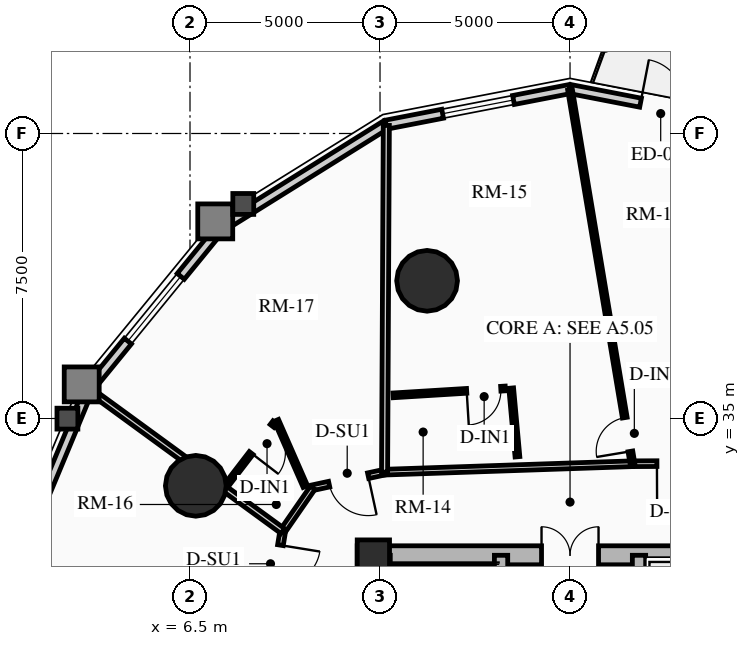
"""IFC4 building model, lengths in metres.
Left out: names, types, materials, properties, quantities, classifications, styles, units other than length and angle.
Written with IfcOpenShell. Run it as: python <this file> out.ifc"""

import sys

from ifc_helpers import new_model, si_unit, direction, frame, frame_2d, origin, origin_2d, place, context, subcontext, project, spatial, rectangle, circle, extrude, source, transform, mapped, element, fill, save


model = new_model("IFC4")
c1 = context("Model", 3, precision=1e-05, world=origin(), true_north=direction((0.0, 1.0)))
c2 = subcontext(c1, "Body", "Model", "MODEL_VIEW")
j1 = project(units=[si_unit("LENGTHUNIT", "METRE"), si_unit("PLANEANGLEUNIT", "RADIAN")], contexts=[c1])
p1 = place(None, origin())
s1 = spatial("IfcSite", under=j1, at=p1, CompositionType="ELEMENT")
p2 = place(p1, origin())
s2 = spatial("IfcBuilding", under=s1, at=p2, CompositionType="ELEMENT")
p3 = place(p2, frame((0.0, 0.0, 48.19)))
s3 = spatial("IfcBuildingStorey", under=s2, at=p3, CompositionType="ELEMENT", Elevation=48.19)
p4 = place(p3, frame((11.15, 17.35, 0.0), z_axis=(0.0, 0.0, 1.0), x_axis=(0.0, 1.0, 0.0)))
e1 = element("IfcWall", 1, at=p4, inside=s3, PredefinedType="SHEAR", context=c2, shape_type="SweptSolid", body=[
    extrude(rectangle(XDim=14.3, YDim=0.5, at=frame_2d((7.15, 0.0))), origin(), (0.0, 0.0, 1.0), 2.91),
])
p5 = place(p3, frame((11.15, 31.4, 0.0), z_axis=(0.0, 0.0, 1.0), x_axis=(1.0, 0.0, 0.0)))
e2 = element("IfcWall", 2, at=p5, inside=s3, PredefinedType="SHEAR", context=c2, shape_type="SweptSolid", body=[
    extrude(rectangle(XDim=10.7, YDim=0.5, at=frame_2d((5.35, 0.0))), origin(), (0.0, 0.0, 1.0), 2.91),
])
m1 = source(origin(), c2, "Body", "SweptSolid", [
    extrude(rectangle(XDim=1.5, YDim=2.02, at=frame_2d((0.75, 1.01))), frame((0.0, 0.26, 0.0), z_axis=(0.0, -1.0, 0.0), x_axis=(1.0, 0.0, 0.0)), (0.0, 0.0, 1.0), 0.52),
])
p6 = place(p5, frame((4.6, 0.0, 0.0)))
e3 = element("IfcOpeningElement", 3, at=p6, cuts=e2, PredefinedType="OPENING", context=c2, shape_type="MappedRepresentation", body=[
    mapped(m1, transform((0.0, 0.0, 0.0), x_axis=(1.0, 0.0, 0.0), y_axis=(0.0, 1.0, 0.0), z_axis=(0.0, 0.0, 1.0), scale=1.0)),
])
p7 = place(p3, frame((14.685, 17.6, 0.0), z_axis=(0.0, 0.0, 1.0), x_axis=(0.0, 1.0, 0.0)))
e4 = element("IfcWall", 4, at=p7, inside=s3, PredefinedType="SHEAR", context=c2, shape_type="SweptSolid", body=[
    extrude(rectangle(XDim=13.8, YDim=0.35, at=frame_2d((6.9, 0.0))), origin(), (0.0, 0.0, 1.0), 2.91),
])
m2 = source(origin(), c2, "Body", "SweptSolid", [
    extrude(rectangle(XDim=1.1, YDim=2.015, at=frame_2d((0.55, 1.007))), frame((0.0, 0.185, 0.0), z_axis=(0.0, -1.0, 0.0), x_axis=(1.0, 0.0, 0.0)), (0.0, 0.0, 1.0), 0.37),
])
p8 = place(p7, frame((4.9, 0.0, 0.0)))
e5 = element("IfcOpeningElement", 5, at=p8, cuts=e4, PredefinedType="OPENING", context=c2, shape_type="MappedRepresentation", body=[
    mapped(m2, transform((0.0, 0.0, 0.0), x_axis=(1.0, 0.0, 0.0), y_axis=(0.0, 1.0, 0.0), z_axis=(0.0, 0.0, 1.0), scale=1.0)),
])
m3 = source(origin(), c2, "Body", "SweptSolid", [
    extrude(rectangle(XDim=1.15, YDim=2.02, at=frame_2d((0.575, 1.01))), frame((0.0, 0.185, 0.0), z_axis=(0.0, -1.0, 0.0), x_axis=(1.0, 0.0, 0.0)), (0.0, 0.0, 1.0), 0.37),
])
p9 = place(p7, frame((7.32, 0.0, 0.0)))
e6 = element("IfcOpeningElement", 6, at=p9, cuts=e4, PredefinedType="OPENING", context=c2, shape_type="MappedRepresentation", body=[
    mapped(m3, transform((0.0, 0.0, 0.0), x_axis=(1.0, 0.0, 0.0), y_axis=(0.0, 1.0, 0.0), z_axis=(0.0, 0.0, 1.0), scale=1.0)),
])
p10 = place(p3, frame((18.315, 17.6, 0.0), z_axis=(0.0, 0.0, 1.0), x_axis=(0.0, 1.0, 0.0)))
e7 = element("IfcWall", 7, at=p10, inside=s3, PredefinedType="SHEAR", context=c2, shape_type="SweptSolid", body=[
    extrude(rectangle(XDim=13.8, YDim=0.35, at=frame_2d((6.9, 0.0))), origin(), (0.0, 0.0, 1.0), 2.91),
])
p11 = place(p10, frame((10.025, 0.0, 0.0)))
e8 = element("IfcOpeningElement", 8, at=p11, cuts=e7, PredefinedType="OPENING", context=c2, shape_type="MappedRepresentation", body=[
    mapped(m2, transform((0.0, 0.0, 0.0), x_axis=(1.0, 0.0, 0.0), y_axis=(0.0, 1.0, 0.0), z_axis=(0.0, 0.0, 1.0), scale=1.0)),
])
p12 = place(p10, frame((12.025, 0.0, 0.0)))
e9 = element("IfcOpeningElement", 9, at=p12, cuts=e7, PredefinedType="OPENING", context=c2, shape_type="MappedRepresentation", body=[
    mapped(m2, transform((0.0, 0.0, 0.0), x_axis=(1.0, 0.0, 0.0), y_axis=(0.0, 1.0, 0.0), z_axis=(0.0, 0.0, 1.0), scale=1.0)),
])
p13 = place(p10, frame((5.33, 0.0, 0.0)))
e10 = element("IfcOpeningElement", 10, at=p13, cuts=e7, PredefinedType="OPENING", context=c2, shape_type="MappedRepresentation", body=[
    mapped(m3, transform((0.0, 0.0, 0.0), x_axis=(1.0, 0.0, 0.0), y_axis=(0.0, 1.0, 0.0), z_axis=(0.0, 0.0, 1.0), scale=1.0)),
])
p14 = place(p3, frame((11.595, 24.655, 0.0), z_axis=(0.0, 0.0, 1.0), x_axis=(0.0, 1.0, 0.0)))
e11 = element("IfcWall", 11, at=p14, inside=s3, PredefinedType="SHEAR", context=c2, shape_type="SweptSolid", body=[
    extrude(rectangle(XDim=6.745, YDim=0.35, at=frame_2d((3.373, 0.0))), origin(), (0.0, 0.0, 1.0), 2.91),
])
p15 = place(p3, frame((11.325, 31.38, 0.0), z_axis=(0.0, 0.0, 1.0), x_axis=(1.0, 0.0, 0.0)))
e12 = element("IfcColumn", 12, at=p15, inside=s3, PredefinedType="COLUMN", context=c2, shape_type="SweptSolid", body=[
    extrude(rectangle(XDim=0.85, YDim=0.85, at=origin_2d()), origin(), (0.0, 0.0, 1.0), 2.91),
])
for number, where, z_axis, x_axis in (
    (13, (12.739, 38.623, 0.0), (0.0, 0.0, 1.0), (1.0, 0.0, 0.0)),
    (14, (6.653, 33.229, 0.0), (0.0, 0.0, 1.0), (1.0, 0.0, 0.0)),
):
    element("IfcColumn", number, at=place(p3, frame(where, z_axis=z_axis, x_axis=x_axis)), inside=s3, PredefinedType="USERDEFINED", context=c2, shape_type="SweptSolid", body=[
        extrude(circle(Radius=0.8, at=origin_2d()), origin(), (0.0, 0.0, 1.0), 2.91),
    ])
p16 = place(p3, frame((16.5, 43.67, 0.0), z_axis=(0.0, 0.0, 1.0), x_axis=(0.981725274071, -0.190303668512, 0.0)))
e15 = element("IfcWall", 15, at=p16, inside=s3, PredefinedType="SOLIDWALL", context=c2, shape_type="SweptSolid", body=[
    extrude(rectangle(XDim=4.93, YDim=0.24, at=frame_2d((2.465, 0.0))), origin(), (0.0, 0.0, 1.0), 2.073),
])
m4 = source(origin(), c2, "Body", "SweptSolid", [
    extrude(rectangle(XDim=1.15, YDim=2.005, at=frame_2d((0.575, 1.002))), frame((0.0, 0.13, 0.0), z_axis=(0.0, -1.0, 0.0), x_axis=(1.0, 0.0, 0.0)), (0.0, 0.0, 1.0), 0.26),
])
p17 = place(p16, frame((1.89, 0.0, 0.0)))
e16 = element("IfcOpeningElement", 16, at=p17, cuts=e15, PredefinedType="OPENING", context=c2, shape_type="MappedRepresentation", body=[
    mapped(m4, transform((0.0, 0.0, 0.0), x_axis=(1.0, 0.0, 0.0), y_axis=(0.0, 1.0, 0.0), z_axis=(0.0, 0.0, 1.0), scale=1.0)),
])
p18 = place(p3, frame((11.66, 42.732, 0.0), z_axis=(0.0, 0.0, 1.0), x_axis=(0.981725274071, 0.190303668512, 0.0)))
e17 = element("IfcWall", 17, at=p18, inside=s3, PredefinedType="SOLIDWALL", context=c2, shape_type="SweptSolid", body=[
    extrude(rectangle(XDim=4.93, YDim=0.24, at=frame_2d((2.465, 0.0))), origin(), (0.0, 0.0, 1.0), 2.073),
])
m5 = source(origin(), c2, "Body", "SweptSolid", [
    extrude(rectangle(XDim=1.9, YDim=1.35, at=frame_2d((0.95, 0.675))), frame((0.0, 0.13, 0.0), z_axis=(0.0, -1.0, 0.0), x_axis=(1.0, 0.0, 0.0)), (0.0, 0.0, 1.0), 0.26),
])
p19 = place(p18, frame((1.515, 0.0, 0.65)))
e18 = element("IfcOpeningElement", 18, at=p19, cuts=e17, PredefinedType="OPENING", context=c2, shape_type="MappedRepresentation", body=[
    mapped(m5, transform((0.0, 0.0, 0.0), x_axis=(1.0, 0.0, 0.0), y_axis=(0.0, 1.0, 0.0), z_axis=(0.0, 0.0, 1.0), scale=1.0)),
])
p20 = place(p3, frame((7.293, 40.009, 0.0), z_axis=(0.0, 0.0, 1.0), x_axis=(0.848533613342, 0.529141481107, 0.0)))
e19 = element("IfcWall", 19, at=p20, inside=s3, PredefinedType="SOLIDWALL", context=c2, shape_type="SweptSolid", body=[
    extrude(rectangle(XDim=5.146, YDim=0.24, at=frame_2d((2.573, 0.0))), origin(), (0.0, 0.0, 1.0), 2.073),
])
p21 = place(p3, frame((3.828, 35.768, 0.0), z_axis=(0.0, 0.0, 1.0), x_axis=(0.632713287022, 0.77438614168, 0.0)))
e20 = element("IfcWall", 20, at=p21, inside=s3, PredefinedType="SOLIDWALL", context=c2, shape_type="SweptSolid", body=[
    extrude(rectangle(XDim=5.477, YDim=0.24, at=frame_2d((2.738, 0.0))), origin(), (0.0, 0.0, 1.0), 2.073),
])
m6 = source(origin(), c2, "Body", "SweptSolid", [
    extrude(rectangle(XDim=2.2, YDim=1.35, at=frame_2d((1.1, 0.675))), frame((0.0, 0.13, 0.0), z_axis=(0.0, -1.0, 0.0), x_axis=(1.0, 0.0, 0.0)), (0.0, 0.0, 1.0), 0.26),
])
p22 = place(p21, frame((1.638, 0.0, 0.65)))
e21 = element("IfcOpeningElement", 21, at=p22, cuts=e20, PredefinedType="OPENING", context=c2, shape_type="MappedRepresentation", body=[
    mapped(m6, transform((0.0, 0.0, 0.0), x_axis=(1.0, 0.0, 0.0), y_axis=(0.0, 1.0, 0.0), z_axis=(0.0, 0.0, 1.0), scale=1.0)),
])
p23 = place(p3, frame((1.604, 30.424, 0.0), z_axis=(0.0, 0.0, 1.0), x_axis=(0.384348836956, 0.923187939442, 0.0)))
e22 = element("IfcWall", 22, at=p23, inside=s3, PredefinedType="SOLIDWALL", context=c2, shape_type="SweptSolid", body=[
    extrude(rectangle(XDim=5.789, YDim=0.24, at=frame_2d((2.894, 0.0))), origin(), (0.0, 0.0, 1.0), 2.073),
])
p24 = place(p3, frame((21.527, 33.824, 0.0), z_axis=(0.0, 0.0, 1.0), x_axis=(-0.999990631344, -0.00432865146, 0.0)))
e23 = element("IfcWall", 23, at=p24, inside=s3, PredefinedType="PARTITIONING", context=c2, shape_type="SweptSolid", body=[
    extrude(rectangle(XDim=3.384, YDim=0.15, at=frame_2d((1.692, 0.0))), origin(), (0.0, 0.0, 1.0), 2.159),
])
m7 = source(origin(), c2, "Body", "SweptSolid", [
    extrude(rectangle(XDim=1.05, YDim=2.015, at=frame_2d((0.525, 1.007))), frame((0.0, 0.085, 0.0), z_axis=(0.0, -1.0, 0.0), x_axis=(1.0, 0.0, 0.0)), (0.0, 0.0, 1.0), 0.17),
])
p25 = place(p24, frame((1.69, 0.0, 0.0)))
e24 = element("IfcOpeningElement", 24, at=p25, cuts=e23, PredefinedType="OPENING", context=c2, shape_type="MappedRepresentation", body=[
    mapped(m7, transform((0.0, 0.0, 0.0), x_axis=(1.0, 0.0, 0.0), y_axis=(0.0, 1.0, 0.0), z_axis=(0.0, 0.0, 1.0), scale=1.0)),
])
p26 = place(p3, frame((18.143, 33.81, 0.0), z_axis=(0.0, 0.0, 1.0), x_axis=(-0.999423023908, -0.033964971394, 0.0)))
e25 = element("IfcWall", 25, at=p26, inside=s3, PredefinedType="PARTITIONING", context=c2, shape_type="SweptSolid", body=[
    extrude(rectangle(XDim=6.527, YDim=0.15, at=frame_2d((3.263, 0.0))), origin(), (0.0, 0.0, 1.0), 2.159),
])
p27 = place(p3, frame((11.62, 33.588, 0.0), z_axis=(0.0, 0.0, 1.0), x_axis=(-0.977392314559, -0.211433827571, 0.0)))
e26 = element("IfcWall", 26, at=p27, inside=s3, PredefinedType="PARTITIONING", context=c2, shape_type="SweptSolid", body=[
    extrude(rectangle(XDim=1.934, YDim=0.15, at=frame_2d((0.967, 0.0))), origin(), (0.0, 0.0, 1.0), 2.159),
])
p28 = place(p27, frame((0.442, 0.0, 0.0)))
e27 = element("IfcOpeningElement", 27, at=p28, cuts=e26, PredefinedType="OPENING", context=c2, shape_type="MappedRepresentation", body=[
    mapped(m7, transform((0.0, 0.0, 0.0), x_axis=(1.0, 0.0, 0.0), y_axis=(0.0, 1.0, 0.0), z_axis=(0.0, 0.0, 1.0), scale=1.0)),
])
p29 = place(p3, frame((9.729, 33.179, 0.0), z_axis=(0.0, 0.0, 1.0), x_axis=(-0.569155068352, -0.822230203878, 0.0)))
e28 = element("IfcWall", 28, at=p29, inside=s3, PredefinedType="PARTITIONING", context=c2, shape_type="SweptSolid", body=[
    extrude(rectangle(XDim=1.387, YDim=0.15, at=frame_2d((0.694, 0.0))), origin(), (0.0, 0.0, 1.0), 2.159),
])
p30 = place(p3, frame((8.94, 32.038, 0.0), z_axis=(0.0, 0.0, 1.0), x_axis=(-0.159917336462, -0.987130409571, 0.0)))
e29 = element("IfcWall", 29, at=p30, inside=s3, PredefinedType="PARTITIONING", context=c2, shape_type="SweptSolid", body=[
    extrude(rectangle(XDim=1.547, YDim=0.15, at=frame_2d((0.773, 0.0))), origin(), (0.0, 0.0, 1.0), 2.205),
])
p31 = place(p30, frame((0.377, 0.0, 0.0)))
e30 = element("IfcOpeningElement", 30, at=p31, cuts=e29, PredefinedType="OPENING", context=c2, shape_type="MappedRepresentation", body=[
    mapped(m7, transform((0.0, 0.0, 0.0), x_axis=(1.0, 0.0, 0.0), y_axis=(0.0, 1.0, 0.0), z_axis=(0.0, 0.0, 1.0), scale=1.0)),
])
p32 = place(p3, frame((11.62, 33.588, 0.0), z_axis=(0.0, 0.0, 1.0), x_axis=(0.005056791532, 0.999987214348, 0.0)))
e31 = element("IfcWall", 31, at=p32, inside=s3, PredefinedType="PARTITIONING", context=c2, shape_type="SweptSolid", body=[
    extrude(rectangle(XDim=9.125, YDim=0.16, at=frame_2d((4.562, 0.0))), origin(), (0.0, 0.0, 1.0), 2.073),
])
p33 = place(p3, frame((8.94, 32.038, 0.0), z_axis=(0.0, 0.0, 1.0), x_axis=(-0.807831293846, 0.58941377714, 0.0)))
e32 = element("IfcWall", 32, at=p33, inside=s3, PredefinedType="PARTITIONING", context=c2, shape_type="SweptSolid", body=[
    extrude(rectangle(XDim=6.308, YDim=0.16, at=frame_2d((3.154, 0.0))), origin(), (0.0, 0.0, 1.0), 2.073),
])
p34 = place(p3, frame((18.143, 33.81, 0.0), z_axis=(0.0, 0.0, 1.0), x_axis=(-0.164668829219, 0.986348912243, 0.0)))
e33 = element("IfcWall", 33, at=p34, inside=s3, PredefinedType="PARTITIONING", context=c2, shape_type="SweptSolid", body=[
    extrude(rectangle(XDim=9.977, YDim=0.125, at=frame_2d((4.988, 0.0))), origin(), (0.0, 0.0, 1.0), 2.073),
])
m8 = source(origin(), c2, "Body", "SweptSolid", [
    extrude(rectangle(XDim=0.9, YDim=2.005, at=frame_2d((0.45, 1.002))), frame((0.0, 0.073, 0.0), z_axis=(0.0, -1.0, 0.0), x_axis=(1.0, 0.0, 0.0)), (0.0, 0.0, 1.0), 0.145),
])
p35 = place(p34, frame((0.33, 0.0, 0.0)))
e34 = element("IfcOpeningElement", 34, at=p35, cuts=e33, PredefinedType="OPENING", context=c2, shape_type="MappedRepresentation", body=[
    mapped(m8, transform((0.0, 0.0, 0.0), x_axis=(1.0, 0.0, 0.0), y_axis=(0.0, 1.0, 0.0), z_axis=(0.0, 0.0, 1.0), scale=1.0)),
])
p36 = place(p3, frame((15.116, 33.993, 0.0), z_axis=(0.0, 0.0, 1.0), x_axis=(-0.090547877021, 0.995892103577, 0.0)))
e35 = element("IfcWall", 35, at=p36, inside=s3, PredefinedType="PARTITIONING", context=c2, shape_type="SweptSolid", body=[
    extrude(rectangle(XDim=1.815, YDim=0.125, at=frame_2d((0.907, 0.0))), origin(), (0.0, 0.0, 1.0), 2.635),
])
p37 = place(p3, frame((14.798, 35.791, 0.0), z_axis=(0.0, 0.0, 1.0), x_axis=(-0.998108365817, -0.06147918417, 0.0)))
e36 = element("IfcWall", 36, at=p37, inside=s3, PredefinedType="PARTITIONING", context=c2, shape_type="SweptSolid", body=[
    extrude(rectangle(XDim=2.958, YDim=0.125, at=frame_2d((1.479, 0.0))), origin(), (0.0, 0.0, 1.0), 2.159),
])
p38 = place(p37, frame((0.12, 0.0, 0.0)))
e37 = element("IfcOpeningElement", 37, at=p38, cuts=e36, PredefinedType="OPENING", context=c2, shape_type="MappedRepresentation", body=[
    mapped(m8, transform((0.0, 0.0, 0.0), x_axis=(1.0, 0.0, 0.0), y_axis=(0.0, 1.0, 0.0), z_axis=(0.0, 0.0, 1.0), scale=1.0)),
])
p39 = place(p3, frame((9.535, 33.211, 0.0), z_axis=(0.0, 0.0, 1.0), x_axis=(-0.401687955793, 0.915776602765, 0.0)))
e38 = element("IfcWall", 38, at=p39, inside=s3, PredefinedType="PARTITIONING", context=c2, shape_type="SweptSolid", body=[
    extrude(rectangle(XDim=1.901, YDim=0.125, at=frame_2d((0.95, 0.0))), origin(), (0.0, 0.0, 1.0), 2.635),
])
p40 = place(p3, frame((8.732, 34.899, 0.0), z_axis=(0.0, 0.0, 1.0), x_axis=(-0.609677010074, -0.792649950096, 0.0)))
e39 = element("IfcWall", 39, at=p40, inside=s3, PredefinedType="PARTITIONING", context=c2, shape_type="SweptSolid", body=[
    extrude(rectangle(XDim=2.097, YDim=0.125, at=frame_2d((1.049, 0.0))), origin(), (0.0, 0.0, 1.0), 2.073),
])
p41 = place(p40, frame((0.12, 0.0, 0.0)))
e40 = element("IfcOpeningElement", 40, at=p41, cuts=e39, PredefinedType="OPENING", context=c2, shape_type="MappedRepresentation", body=[
    mapped(m8, transform((0.0, 0.0, 0.0), x_axis=(1.0, 0.0, 0.0), y_axis=(0.0, 1.0, 0.0), z_axis=(0.0, 0.0, 1.0), scale=1.0)),
])
m9 = source(origin(), c2, "Body", "SweptSolid", [
    extrude(rectangle(XDim=1.15, YDim=2.005, at=frame_2d((0.575, 1.002))), frame((0.0, 0.025, 0.0), z_axis=(0.0, -1.0, 0.0), x_axis=(1.0, 0.0, 0.0)), (0.0, 0.0, 1.0), 0.05),
])
p42 = place(p17, origin())
e41 = element("IfcDoor", 41, at=p42, inside=s3, OperationType="SINGLE_SWING_LEFT", PredefinedType="DOOR", context=c2, shape_type="MappedRepresentation", body=[
    mapped(m9, transform((0.0, 0.0, 0.0), x_axis=(1.0, 0.0, 0.0), y_axis=(0.0, 1.0, 0.0), z_axis=(0.0, 0.0, 1.0), scale=1.0)),
])
fill(e16, e41)
m10 = source(origin(), c2, "Body", "SweptSolid", [
    extrude(rectangle(XDim=1.9, YDim=1.35, at=frame_2d((0.95, 0.675))), frame((0.0, 0.03, 0.0), z_axis=(0.0, -1.0, 0.0), x_axis=(1.0, 0.0, 0.0)), (0.0, 0.0, 1.0), 0.06),
])
p43 = place(p19, origin())
e42 = element("IfcWindow", 42, at=p43, inside=s3, PartitioningType="DOUBLE_PANEL_VERTICAL", PredefinedType="WINDOW", context=c2, shape_type="MappedRepresentation", body=[
    mapped(m10, transform((0.0, 0.0, 0.0), x_axis=(1.0, 0.0, 0.0), y_axis=(0.0, 1.0, 0.0), z_axis=(0.0, 0.0, 1.0), scale=1.0)),
])
fill(e18, e42)
m11 = source(origin(), c2, "Body", "SweptSolid", [
    extrude(rectangle(XDim=2.2, YDim=1.35, at=frame_2d((1.1, 0.675))), frame((0.0, 0.03, 0.0), z_axis=(0.0, -1.0, 0.0), x_axis=(1.0, 0.0, 0.0)), (0.0, 0.0, 1.0), 0.06),
])
p44 = place(p22, origin())
e43 = element("IfcWindow", 43, at=p44, inside=s3, PartitioningType="DOUBLE_PANEL_VERTICAL", PredefinedType="WINDOW", context=c2, shape_type="MappedRepresentation", body=[
    mapped(m11, transform((0.0, 0.0, 0.0), x_axis=(1.0, 0.0, 0.0), y_axis=(0.0, 1.0, 0.0), z_axis=(0.0, 0.0, 1.0), scale=1.0)),
])
fill(e21, e43)
m12 = source(origin(), c2, "Body", "SweptSolid", [
    extrude(rectangle(XDim=1.5, YDim=2.02, at=frame_2d((0.75, 1.01))), frame((0.0, 0.025, 0.0), z_axis=(0.0, -1.0, 0.0), x_axis=(1.0, 0.0, 0.0)), (0.0, 0.0, 1.0), 0.05),
])
p45 = place(p6, origin())
e44 = element("IfcDoor", 44, at=p45, inside=s3, OperationType="DOUBLE_DOOR_SINGLE_SWING", PredefinedType="DOOR", context=c2, shape_type="MappedRepresentation", body=[
    mapped(m12, transform((0.0, 0.0, 0.0), x_axis=(1.0, 0.0, 0.0), y_axis=(0.0, 1.0, 0.0), z_axis=(0.0, 0.0, 1.0), scale=1.0)),
])
fill(e3, e44)
m13 = source(origin(), c2, "Body", "SweptSolid", [
    extrude(rectangle(XDim=1.05, YDim=2.015, at=frame_2d((0.525, 1.007))), frame((0.0, 0.025, 0.0), z_axis=(0.0, -1.0, 0.0), x_axis=(1.0, 0.0, 0.0)), (0.0, 0.0, 1.0), 0.05),
])
p46 = place(p25, origin())
e45 = element("IfcDoor", 45, at=p46, inside=s3, OperationType="SINGLE_SWING_RIGHT", PredefinedType="DOOR", context=c2, shape_type="MappedRepresentation", body=[
    mapped(m13, transform((0.0, 0.0, 0.0), x_axis=(1.0, 0.0, 0.0), y_axis=(0.0, 1.0, 0.0), z_axis=(0.0, 0.0, 1.0), scale=1.0)),
])
fill(e24, e45)
m14 = source(origin(), c2, "Body", "SweptSolid", [
    extrude(rectangle(XDim=0.9, YDim=2.005, at=frame_2d((0.45, 1.002))), frame((0.0, 0.025, 0.0), z_axis=(0.0, -1.0, 0.0), x_axis=(1.0, 0.0, 0.0)), (0.0, 0.0, 1.0), 0.05),
])
p47 = place(p35, origin())
e46 = element("IfcDoor", 46, at=p47, inside=s3, OperationType="SINGLE_SWING_LEFT", PredefinedType="DOOR", context=c2, shape_type="MappedRepresentation", body=[
    mapped(m14, transform((0.0, 0.0, 0.0), x_axis=(1.0, 0.0, 0.0), y_axis=(0.0, 1.0, 0.0), z_axis=(0.0, 0.0, 1.0), scale=1.0)),
])
fill(e34, e46)
p48 = place(p38, origin())
e47 = element("IfcDoor", 47, at=p48, inside=s3, OperationType="SINGLE_SWING_RIGHT", PredefinedType="DOOR", context=c2, shape_type="MappedRepresentation", body=[
    mapped(m14, transform((0.0, 0.0, 0.0), x_axis=(1.0, 0.0, 0.0), y_axis=(0.0, 1.0, 0.0), z_axis=(0.0, 0.0, 1.0), scale=1.0)),
])
fill(e37, e47)
p49 = place(p28, origin())
e48 = element("IfcDoor", 48, at=p49, inside=s3, OperationType="SINGLE_SWING_LEFT", PredefinedType="DOOR", context=c2, shape_type="MappedRepresentation", body=[
    mapped(m13, transform((0.0, 0.0, 0.0), x_axis=(1.0, 0.0, 0.0), y_axis=(0.0, 1.0, 0.0), z_axis=(0.0, 0.0, 1.0), scale=1.0)),
])
fill(e27, e48)
p50 = place(p41, origin())
e49 = element("IfcDoor", 49, at=p50, inside=s3, OperationType="SINGLE_SWING_RIGHT", PredefinedType="DOOR", context=c2, shape_type="MappedRepresentation", body=[
    mapped(m14, transform((0.0, 0.0, 0.0), x_axis=(1.0, 0.0, 0.0), y_axis=(0.0, 1.0, 0.0), z_axis=(0.0, 0.0, 1.0), scale=1.0)),
])
fill(e40, e49)
p51 = place(p31, origin())
e50 = element("IfcDoor", 50, at=p51, inside=s3, OperationType="SINGLE_SWING_LEFT", PredefinedType="DOOR", context=c2, shape_type="MappedRepresentation", body=[
    mapped(m13, transform((0.0, 0.0, 0.0), x_axis=(1.0, 0.0, 0.0), y_axis=(0.0, 1.0, 0.0), z_axis=(0.0, 0.0, 1.0), scale=1.0)),
])
fill(e30, e50)
save(model, sys.argv[1])
